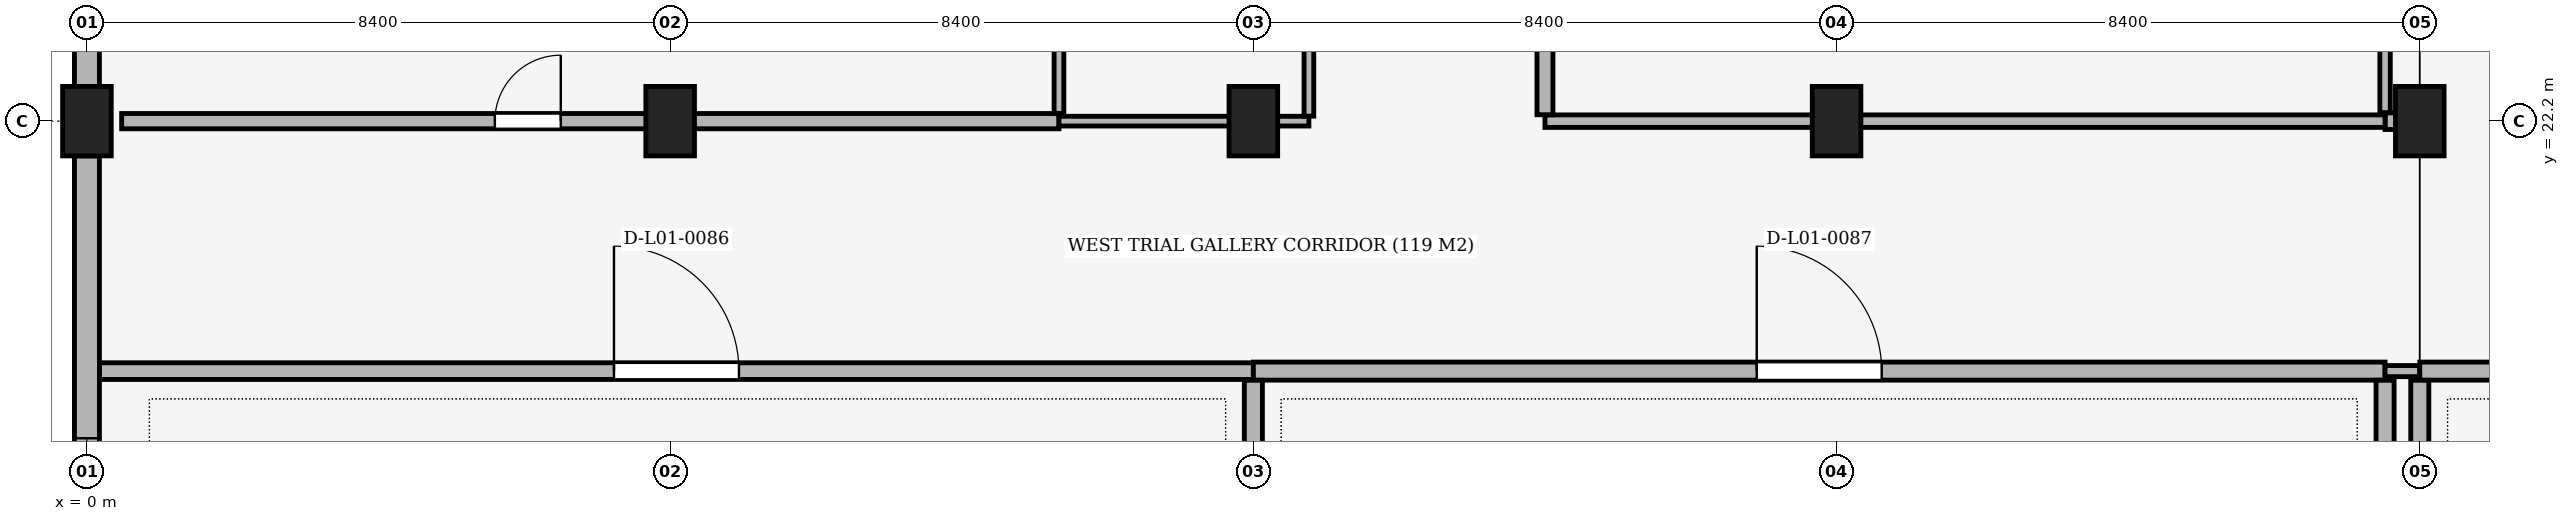
"""IFC4 building model, lengths in metres.
Left out: names, types, materials, properties, quantities, classifications, styles, units other than length and angle.
Written with IfcOpenShell. Run it as: python <this file> out.ifc"""

import sys

from ifc_helpers import new_model, si_unit, direction, frame, frame_2d, origin, origin_2d, place, context, subcontext, project, spatial, rectangle, extrude, element, fill, save


model = new_model("IFC4")
c1 = context("Model", 3, precision=1e-05, world=origin(), true_north=direction((0.0, 1.0)))
c2 = subcontext(c1, "Body", "Model", "MODEL_VIEW")
j1 = project(units=[si_unit("LENGTHUNIT", "METRE"), si_unit("PLANEANGLEUNIT", "RADIAN")], contexts=[c1])
p1 = place(None, origin())
s1 = spatial("IfcSite", under=j1, at=p1, CompositionType="ELEMENT")
p2 = place(p1, origin())
s2 = spatial("IfcBuilding", under=s1, at=p2, CompositionType="ELEMENT")
p3 = place(p2, frame((0.0, 0.0, 5.1)))
s3 = spatial("IfcBuildingStorey", under=s2, at=p3, CompositionType="ELEMENT", Elevation=5.1)
for number, where, z_axis, x_axis in (
    (1, (0.0, 22.2, 0.0), (0.0, 0.0, 1.0), (1.0, 0.0, 0.0)),
    (2, (8.4, 22.2, 0.0), (0.0, 0.0, 1.0), (1.0, 0.0, 0.0)),
    (3, (16.8, 22.2, 0.0), (0.0, 0.0, 1.0), (1.0, 0.0, 0.0)),
    (4, (25.2, 22.2, 0.0), (0.0, 0.0, 1.0), (1.0, 0.0, 0.0)),
    (5, (33.6, 22.2, 0.0), (0.0, 0.0, 1.0), (1.0, 0.0, 0.0)),
):
    element("IfcColumn", number, at=place(p3, frame(where, z_axis=z_axis, x_axis=x_axis)), inside=s3, PredefinedType="COLUMN", context=c2, shape_type="SweptSolid", body=[
        extrude(rectangle(XDim=0.7, YDim=1.0, at=origin_2d()), origin(), (0.0, 0.0, 1.0), 5.1),
    ])
p4 = place(p3, frame((0.0, 5.9, 0.0), z_axis=(0.0, 0.0, 1.0), x_axis=(0.0, 1.0, 0.0)))
e6 = element("IfcWall", 6, at=p4, inside=s3, PredefinedType="SOLIDWALL", context=c2, shape_type="SweptSolid", body=[
    extrude(rectangle(XDim=15.8, YDim=0.36, at=frame_2d((7.9, 0.0))), origin(), (0.0, 0.0, 1.0), 3.67),
])
p5 = place(p4, frame((4.067, 0.0, 0.85)))
e7 = element("IfcOpeningElement", 7, at=p5, cuts=e6, PredefinedType="OPENING", context=c2, shape_type="SweptSolid", body=[
    extrude(rectangle(XDim=1.8, YDim=2.4, at=frame_2d((0.9, 1.2))), frame((0.0, 0.195, 0.0), z_axis=(0.0, -1.0, 0.0), x_axis=(1.0, 0.0, 0.0)), (0.0, 0.0, 1.0), 0.39),
])
p6 = place(p4, frame((9.933, 0.0, 0.85)))
e8 = element("IfcOpeningElement", 8, at=p6, cuts=e6, PredefinedType="OPENING", context=c2, shape_type="SweptSolid", body=[
    extrude(rectangle(XDim=1.8, YDim=2.4, at=frame_2d((0.9, 1.2))), frame((0.0, 0.195, 0.0), z_axis=(0.0, -1.0, 0.0), x_axis=(1.0, 0.0, 0.0)), (0.0, 0.0, 1.0), 0.39),
])
p7 = place(p3, frame((0.0, 22.7, 0.0), z_axis=(0.0, 0.0, 1.0), x_axis=(0.0, 1.0, 0.0)))
e9 = element("IfcWall", 9, at=p7, inside=s3, PredefinedType="SOLIDWALL", context=c2, shape_type="SweptSolid", body=[
    extrude(rectangle(XDim=3.8, YDim=0.36, at=frame_2d((1.9, 0.0))), origin(), (0.0, 0.0, 1.0), 4.27),
])
p8 = place(p7, frame((1.0, 0.0, 0.85)))
e10 = element("IfcOpeningElement", 10, at=p8, cuts=e9, PredefinedType="OPENING", context=c2, shape_type="SweptSolid", body=[
    extrude(rectangle(XDim=1.8, YDim=2.4, at=frame_2d((0.9, 1.2))), frame((0.0, 0.195, 0.0), z_axis=(0.0, -1.0, 0.0), x_axis=(1.0, 0.0, 0.0)), (0.0, 0.0, 1.0), 0.39),
])
p9 = place(p3, frame((0.182, 18.6, 0.0), z_axis=(0.0, 0.0, 1.0), x_axis=(1.0, 0.0, 0.0)))
e11 = element("IfcWall", 11, at=p9, inside=s3, PredefinedType="PARTITIONING", context=c2, shape_type="SweptSolid", body=[
    extrude(rectangle(XDim=16.618, YDim=0.24, at=frame_2d((8.309, 0.0))), origin(), (0.0, 0.0, 1.0), 3.67),
])
p10 = place(p9, frame((7.409, 0.0, 0.0)))
e12 = element("IfcOpeningElement", 12, at=p10, cuts=e11, PredefinedType="OPENING", context=c2, shape_type="SweptSolid", body=[
    extrude(rectangle(XDim=1.8, YDim=2.4, at=frame_2d((0.9, 1.2))), frame((0.0, 0.135, 0.0), z_axis=(0.0, -1.0, 0.0), x_axis=(1.0, 0.0, 0.0)), (0.0, 0.0, 1.0), 0.27),
])
p11 = place(p3, frame((16.8, 18.6, 0.0), z_axis=(0.0, 0.0, 1.0), x_axis=(1.0, 0.0, 0.0)))
e13 = element("IfcWall", 13, at=p11, inside=s3, PredefinedType="PARTITIONING", context=c2, shape_type="SweptSolid", body=[
    extrude(rectangle(XDim=16.3, YDim=0.26, at=frame_2d((8.15, 0.0))), origin(), (0.0, 0.0, 1.0), 3.67),
])
p12 = place(p11, frame((7.25, 0.0, 0.0)))
e14 = element("IfcOpeningElement", 14, at=p12, cuts=e13, PredefinedType="OPENING", context=c2, shape_type="SweptSolid", body=[
    extrude(rectangle(XDim=1.8, YDim=2.4, at=frame_2d((0.9, 1.2))), frame((0.0, 0.145, 0.0), z_axis=(0.0, -1.0, 0.0), x_axis=(1.0, 0.0, 0.0)), (0.0, 0.0, 1.0), 0.29),
])
p13 = place(p3, frame((33.1, 18.6, 0.0), z_axis=(0.0, 0.0, 1.0), x_axis=(1.0, 0.0, 0.0)))
e15 = element("IfcWall", 15, at=p13, inside=s3, PredefinedType="PARTITIONING", context=c2, shape_type="SweptSolid", body=[
    extrude(rectangle(XDim=0.5, YDim=0.16, at=frame_2d((0.25, 0.0))), origin(), (0.0, 0.0, 1.0), 3.67),
])
p14 = place(p3, frame((33.6, 18.6, 0.0), z_axis=(0.0, 0.0, 1.0), x_axis=(1.0, 0.0, 0.0)))
e16 = element("IfcWall", 16, at=p14, inside=s3, PredefinedType="PARTITIONING", context=c2, shape_type="SweptSolid", body=[
    extrude(rectangle(XDim=16.8, YDim=0.26, at=frame_2d((8.4, 0.0))), origin(), (0.0, 0.0, 1.0), 3.67),
])
p15 = place(p14, frame((7.5, 0.0, 0.0)))
e17 = element("IfcOpeningElement", 17, at=p15, cuts=e16, PredefinedType="OPENING", context=c2, shape_type="SweptSolid", body=[
    extrude(rectangle(XDim=1.8, YDim=2.4, at=frame_2d((0.9, 1.2))), frame((0.0, 0.145, 0.0), z_axis=(0.0, -1.0, 0.0), x_axis=(1.0, 0.0, 0.0)), (0.0, 0.0, 1.0), 0.29),
])
p16 = place(p3, frame((33.1, 22.2, 0.0), z_axis=(0.0, 0.0, 1.0), x_axis=(1.0, 0.0, 0.0)))
e18 = element("IfcWall", 18, at=p16, inside=s3, PredefinedType="PARTITIONING", context=c2, shape_type="SweptSolid", body=[
    extrude(rectangle(XDim=0.5, YDim=0.24, at=frame_2d((0.25, 0.0))), origin(), (0.0, 0.0, 1.0), 4.07),
])
p17 = place(p3, frame((0.5, 22.2, 0.0), z_axis=(0.0, 0.0, 1.0), x_axis=(1.0, 0.0, 0.0)))
e19 = element("IfcWall", 19, at=p17, inside=s3, PredefinedType="PARTITIONING", context=c2, shape_type="SweptSolid", body=[
    extrude(rectangle(XDim=13.5, YDim=0.22, at=frame_2d((6.75, 0.0))), origin(), (0.0, 0.0, 1.0), 4.07),
])
p18 = place(p17, frame((5.375, 0.0, 0.0)))
e20 = element("IfcOpeningElement", 20, at=p18, cuts=e19, PredefinedType="OPENING", context=c2, shape_type="SweptSolid", body=[
    extrude(rectangle(XDim=0.95, YDim=2.1, at=frame_2d((0.475, 1.05))), frame((0.0, 0.125, 0.0), z_axis=(0.0, -1.0, 0.0), x_axis=(1.0, 0.0, 0.0)), (0.0, 0.0, 1.0), 0.25),
])
p19 = place(p3, frame((14.0, 22.2, 0.0), z_axis=(0.0, 0.0, 1.0), x_axis=(1.0, 0.0, 0.0)))
e21 = element("IfcWall", 21, at=p19, inside=s3, PredefinedType="PARTITIONING", context=c2, shape_type="SweptSolid", body=[
    extrude(rectangle(XDim=3.6, YDim=0.14, at=frame_2d((1.8, 0.0))), origin(), (0.0, 0.0, 1.0), 4.07),
])
p20 = place(p3, frame((21.0, 22.2, 0.0), z_axis=(0.0, 0.0, 1.0), x_axis=(1.0, 0.0, 0.0)))
e22 = element("IfcWall", 22, at=p20, inside=s3, PredefinedType="PARTITIONING", context=c2, shape_type="SweptSolid", body=[
    extrude(rectangle(XDim=12.1, YDim=0.18, at=frame_2d((6.05, 0.0))), origin(), (0.0, 0.0, 1.0), 4.07),
])
p21 = place(p3, frame((14.0, 22.312, 0.0), z_axis=(0.0, 0.0, 1.0), x_axis=(0.0, 1.0, 0.0)))
e23 = element("IfcWall", 23, at=p21, inside=s3, PredefinedType="PARTITIONING", context=c2, shape_type="SweptSolid", body=[
    extrude(rectangle(XDim=5.616, YDim=0.14, at=frame_2d((2.808, 0.0))), origin(), (0.0, 0.0, 1.0), 4.07),
])
p22 = place(p3, frame((16.8, 0.065, 0.0), z_axis=(0.0, 0.0, 1.0), x_axis=(0.0, 1.0, 0.0)))
e24 = element("IfcWall", 24, at=p22, inside=s3, PredefinedType="PARTITIONING", context=c2, shape_type="SweptSolid", body=[
    extrude(rectangle(XDim=18.403, YDim=0.26, at=frame_2d((9.202, 0.0))), origin(), (0.0, 0.0, 1.0), 3.67),
])
p23 = place(p3, frame((17.6, 22.272, 0.0), z_axis=(0.0, 0.0, 1.0), x_axis=(0.0, 1.0, 0.0)))
e25 = element("IfcWall", 25, at=p23, inside=s3, PredefinedType="PARTITIONING", context=c2, shape_type="SweptSolid", body=[
    extrude(rectangle(XDim=5.656, YDim=0.14, at=frame_2d((2.828, 0.0))), origin(), (0.0, 0.0, 1.0), 4.07),
])
p24 = place(p23, frame((2.378, 0.0, 0.0)))
e26 = element("IfcOpeningElement", 26, at=p24, cuts=e25, PredefinedType="OPENING", context=c2, shape_type="SweptSolid", body=[
    extrude(rectangle(XDim=0.9, YDim=2.1, at=frame_2d((0.45, 1.05))), frame((0.0, 0.085, 0.0), z_axis=(0.0, -1.0, 0.0), x_axis=(1.0, 0.0, 0.0)), (0.0, 0.0, 1.0), 0.17),
])
p25 = place(p3, frame((21.0, 22.292, 0.0), z_axis=(0.0, 0.0, 1.0), x_axis=(0.0, 1.0, 0.0)))
e27 = element("IfcWall", 27, at=p25, inside=s3, PredefinedType="SOLIDWALL", context=c2, shape_type="SweptSolid", body=[
    extrude(rectangle(XDim=12.636, YDim=0.23, at=frame_2d((6.318, 0.0))), origin(), (0.0, 0.0, 1.0), 4.07),
])
p26 = place(p25, frame((5.593, 0.0, 0.0)))
e28 = element("IfcOpeningElement", 28, at=p26, cuts=e27, PredefinedType="OPENING", context=c2, shape_type="SweptSolid", body=[
    extrude(rectangle(XDim=1.45, YDim=2.25, at=frame_2d((0.725, 1.125))), frame((0.0, 0.13, 0.0), z_axis=(0.0, -1.0, 0.0), x_axis=(1.0, 0.0, 0.0)), (0.0, 0.0, 1.0), 0.26),
])
p27 = place(p3, frame((33.1, 0.182, 0.0), z_axis=(0.0, 0.0, 1.0), x_axis=(0.0, 1.0, 0.0)))
e29 = element("IfcWall", 29, at=p27, inside=s3, PredefinedType="PARTITIONING", context=c2, shape_type="SweptSolid", body=[
    extrude(rectangle(XDim=18.286, YDim=0.26, at=frame_2d((9.143, 0.0))), origin(), (0.0, 0.0, 1.0), 4.07),
])
p28 = place(p3, frame((33.1, 22.322, 0.0), z_axis=(0.0, 0.0, 1.0), x_axis=(0.0, 1.0, 0.0)))
e30 = element("IfcWall", 30, at=p28, inside=s3, PredefinedType="PARTITIONING", context=c2, shape_type="SweptSolid", body=[
    extrude(rectangle(XDim=12.606, YDim=0.15, at=frame_2d((6.303, 0.0))), origin(), (0.0, 0.0, 1.0), 4.07),
])
p29 = place(p3, frame((33.6, 0.065, 0.0), z_axis=(0.0, 0.0, 1.0), x_axis=(0.0, 1.0, 0.0)))
e31 = element("IfcWall", 31, at=p29, inside=s3, PredefinedType="PARTITIONING", context=c2, shape_type="SweptSolid", body=[
    extrude(rectangle(XDim=18.403, YDim=0.26, at=frame_2d((9.202, 0.0))), origin(), (0.0, 0.0, 1.0), 3.67),
])
p30 = place(p6, origin())
e32 = element("IfcWindow", 32, at=p30, inside=s3, PartitioningType="SINGLE_PANEL", PredefinedType="WINDOW", context=c2, shape_type="SweptSolid", body=[
    extrude(rectangle(XDim=1.8, YDim=2.4, at=frame_2d((0.9, 1.2))), frame((0.0, 0.03, 0.0), z_axis=(0.0, -1.0, 0.0), x_axis=(1.0, 0.0, 0.0)), (0.0, 0.0, 1.0), 0.06),
])
fill(e8, e32)
p31 = place(p10, origin())
e33 = element("IfcDoor", 33, at=p31, inside=s3, OperationType="SINGLE_SWING_LEFT", PredefinedType="DOOR", context=c2, shape_type="SweptSolid", body=[
    extrude(rectangle(XDim=1.8, YDim=2.4, at=frame_2d((0.9, 1.2))), frame((0.0, 0.025, 0.0), z_axis=(0.0, -1.0, 0.0), x_axis=(1.0, 0.0, 0.0)), (0.0, 0.0, 1.0), 0.05),
])
fill(e12, e33)
p32 = place(p12, origin())
e34 = element("IfcDoor", 34, at=p32, inside=s3, OperationType="SINGLE_SWING_LEFT", PredefinedType="DOOR", context=c2, shape_type="SweptSolid", body=[
    extrude(rectangle(XDim=1.8, YDim=2.4, at=frame_2d((0.9, 1.2))), frame((0.0, 0.025, 0.0), z_axis=(0.0, -1.0, 0.0), x_axis=(1.0, 0.0, 0.0)), (0.0, 0.0, 1.0), 0.05),
])
fill(e14, e34)
p33 = place(p18, origin())
e35 = element("IfcDoor", 35, at=p33, inside=s3, OperationType="SINGLE_SWING_RIGHT", PredefinedType="DOOR", context=c2, shape_type="SweptSolid", body=[
    extrude(rectangle(XDim=0.95, YDim=2.1, at=frame_2d((0.475, 1.05))), frame((0.0, 0.025, 0.0), z_axis=(0.0, -1.0, 0.0), x_axis=(1.0, 0.0, 0.0)), (0.0, 0.0, 1.0), 0.05),
])
fill(e20, e35)
save(model, sys.argv[1])
